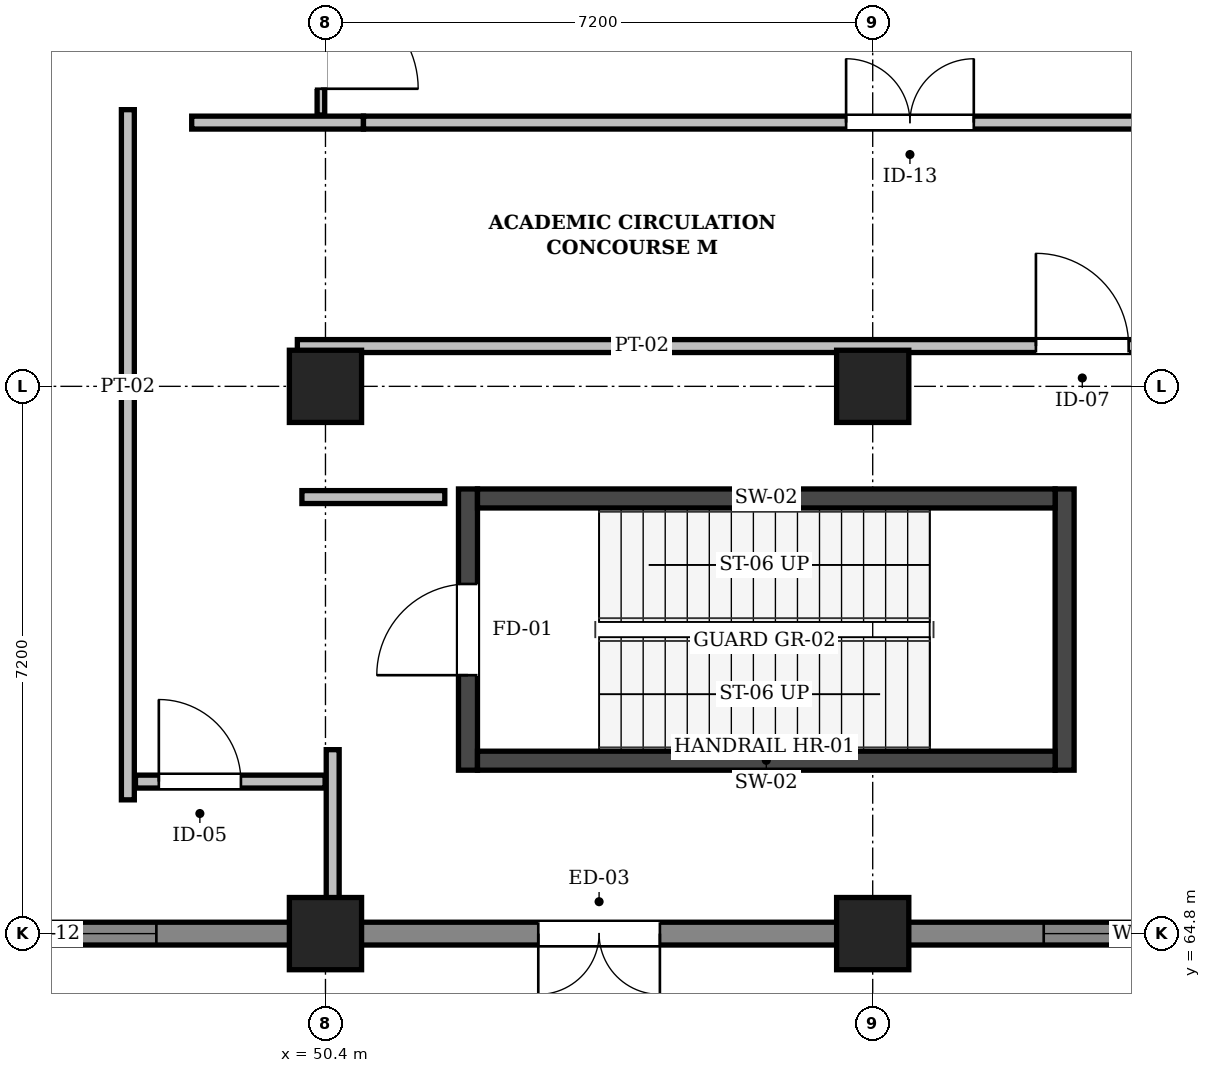
"""IFC4 building model, lengths in metres.
Left out: names, types, materials, properties, quantities, classifications, styles, units other than length and angle.
Written with IfcOpenShell. Run it as: python <this file> out.ifc"""

import sys

from ifc_helpers import new_model, si_unit, direction, frame, frame_2d, origin, origin_2d, place, context, subcontext, project, spatial, rectangle, extrude, element, fill, save


model = new_model("IFC4")
c1 = context("Model", 3, precision=1e-05, world=origin(), true_north=direction((0.0, 1.0)))
c2 = subcontext(c1, "Body", "Model", "MODEL_VIEW")
j1 = project(units=[si_unit("LENGTHUNIT", "METRE"), si_unit("PLANEANGLEUNIT", "RADIAN")], contexts=[c1])
p1 = place(None, origin())
s1 = spatial("IfcSite", under=j1, at=p1, CompositionType="ELEMENT")
p2 = place(p1, origin())
s2 = spatial("IfcBuilding", under=s1, at=p2, CompositionType="ELEMENT")
p3 = place(p2, origin())
s3 = spatial("IfcBuildingStorey", under=s2, at=p3, CompositionType="ELEMENT", Elevation=0.0)
for number, where, z_axis, x_axis in (
    (1, (50.4, 64.8, 0.0), (0.0, 0.0, 1.0), (1.0, 0.0, 0.0)),
    (2, (50.4, 72.0, 0.0), (0.0, 0.0, 1.0), (1.0, 0.0, 0.0)),
    (3, (57.6, 64.8, 0.0), (0.0, 0.0, 1.0), (1.0, 0.0, 0.0)),
    (4, (57.6, 72.0, 0.0), (0.0, 0.0, 1.0), (1.0, 0.0, 0.0)),
):
    element("IfcColumn", number, at=place(p3, frame(where, z_axis=z_axis, x_axis=x_axis)), inside=s3, PredefinedType="COLUMN", context=c2, shape_type="SweptSolid", body=[
        extrude(rectangle(XDim=0.95, YDim=0.95, at=origin_2d()), origin(), (0.0, 0.0, 1.0), 4.8),
    ])
p4 = place(p3, frame((64.8, 64.8, 0.0), z_axis=(0.0, 0.0, 1.0), x_axis=(-1.0, 0.0, 0.0)))
e5 = element("IfcWall", 5, at=p4, inside=s3, PredefinedType="SOLIDWALL", context=c2, shape_type="SweptSolid", body=[
    extrude(rectangle(XDim=7.2, YDim=0.3, at=frame_2d((3.6, 0.0))), origin(), (0.0, 0.0, 1.0), 4.52),
])
p5 = place(p4, frame((2.25, 0.0, 0.95)))
e6 = element("IfcOpeningElement", 6, at=p5, cuts=e5, PredefinedType="OPENING", context=c2, shape_type="SweptSolid", body=[
    extrude(rectangle(XDim=2.7, YDim=1.3, at=frame_2d((1.35, 0.65))), frame((0.0, 0.162, 0.0), z_axis=(0.0, -1.0, 0.0), x_axis=(1.0, 0.0, 0.0)), (0.0, 0.0, 1.0), 0.324),
])
p6 = place(p3, frame((57.6, 64.8, 0.0), z_axis=(0.0, 0.0, 1.0), x_axis=(-1.0, 0.0, 0.0)))
e7 = element("IfcWall", 7, at=p6, inside=s3, PredefinedType="SOLIDWALL", context=c2, shape_type="SweptSolid", body=[
    extrude(rectangle(XDim=7.2, YDim=0.3, at=frame_2d((3.6, 0.0))), origin(), (0.0, 0.0, 1.0), 4.52),
])
p7 = place(p6, frame((2.8, 0.0, 0.0)))
e8 = element("IfcOpeningElement", 8, at=p7, cuts=e7, PredefinedType="OPENING", context=c2, shape_type="SweptSolid", body=[
    extrude(rectangle(XDim=1.6, YDim=2.2, at=frame_2d((0.8, 1.1))), frame((0.0, 0.162, 0.0), z_axis=(0.0, -1.0, 0.0), x_axis=(1.0, 0.0, 0.0)), (0.0, 0.0, 1.0), 0.324),
])
p8 = place(p3, frame((50.4, 64.8, 0.0), z_axis=(0.0, 0.0, 1.0), x_axis=(-1.0, 0.0, 0.0)))
e9 = element("IfcWall", 9, at=p8, inside=s3, PredefinedType="SOLIDWALL", context=c2, shape_type="SweptSolid", body=[
    extrude(rectangle(XDim=7.35, YDim=0.3, at=frame_2d((3.675, 0.0))), origin(), (0.0, 0.0, 1.0), 4.52),
])
p9 = place(p8, frame((2.225, 0.0, 0.95)))
e10 = element("IfcOpeningElement", 10, at=p9, cuts=e9, PredefinedType="OPENING", context=c2, shape_type="SweptSolid", body=[
    extrude(rectangle(XDim=2.9, YDim=1.3, at=frame_2d((1.45, 0.65))), frame((0.0, 0.162, 0.0), z_axis=(0.0, -1.0, 0.0), x_axis=(1.0, 0.0, 0.0)), (0.0, 0.0, 1.0), 0.324),
])
p10 = place(p3, frame((52.275, 66.95, 0.0), z_axis=(0.0, 0.0, 1.0), x_axis=(0.0, 1.0, 0.0)))
e11 = element("IfcWall", 11, at=p10, inside=s3, PredefinedType="SHEAR", context=c2, shape_type="SweptSolid", body=[
    extrude(rectangle(XDim=3.7, YDim=0.25, at=frame_2d((1.85, 0.0))), origin(), (0.0, 0.0, 1.0), 4.55),
])
p11 = place(p10, frame((1.25, 0.0, 0.0)))
e12 = element("IfcOpeningElement", 12, at=p11, cuts=e11, PredefinedType="OPENING", context=c2, shape_type="SweptSolid", body=[
    extrude(rectangle(XDim=1.2, YDim=2.15, at=frame_2d((0.6, 1.075))), frame((0.0, 0.137, 0.0), z_axis=(0.0, -1.0, 0.0), x_axis=(1.0, 0.0, 0.0)), (0.0, 0.0, 1.0), 0.274),
])
p12 = place(p3, frame((60.125, 66.95, 0.0), z_axis=(0.0, 0.0, 1.0), x_axis=(0.0, 1.0, 0.0)))
e13 = element("IfcWall", 13, at=p12, inside=s3, PredefinedType="SHEAR", context=c2, shape_type="SweptSolid", body=[
    extrude(rectangle(XDim=3.7, YDim=0.25, at=frame_2d((1.85, 0.0))), origin(), (0.0, 0.0, 1.0), 4.55),
])
for number, where, z_axis, x_axis in (
    (14, (52.4, 67.075, 0.0), (0.0, 0.0, 1.0), (1.0, 0.0, 0.0)),
    (15, (52.4, 70.525, 0.0), (0.0, 0.0, 1.0), (1.0, 0.0, 0.0)),
):
    element("IfcWall", number, at=place(p3, frame(where, z_axis=z_axis, x_axis=x_axis)), inside=s3, PredefinedType="SHEAR", context=c2, shape_type="SweptSolid", body=[
        extrude(rectangle(XDim=7.6, YDim=0.25, at=frame_2d((3.8, 0.0))), origin(), (0.0, 0.0, 1.0), 4.55),
    ])
p13 = place(p3, frame((50.495, 64.962, 0.0), z_axis=(0.0, 0.0, 1.0), x_axis=(0.0, 1.0, 0.0)))
e16 = element("IfcWall", 16, at=p13, inside=s3, PredefinedType="PARTITIONING", context=c2, shape_type="SweptSolid", body=[
    extrude(rectangle(XDim=2.258, YDim=0.17, at=frame_2d((1.129, 0.0))), origin(), (0.0, 0.0, 1.0), 4.08),
])
p14 = place(p3, frame((50.09, 70.543, 0.0), z_axis=(0.0, 0.0, 1.0), x_axis=(1.0, 0.0, 0.0)))
e17 = element("IfcWall", 17, at=p14, inside=s3, PredefinedType="PARTITIONING", context=c2, shape_type="SweptSolid", body=[
    extrude(rectangle(XDim=1.88, YDim=0.17, at=frame_2d((0.94, 0.0))), origin(), (0.0, 0.0, 1.0), 4.46),
])
p15 = place(p3, frame((48.64, 75.47, 0.0), z_axis=(0.0, 0.0, 1.0), x_axis=(1.0, 0.0, 0.0)))
e18 = element("IfcWall", 18, at=p15, inside=s3, PredefinedType="PARTITIONING", context=c2, shape_type="SweptSolid", body=[
    extrude(rectangle(XDim=2.26, YDim=0.17, at=frame_2d((1.13, 0.0))), origin(), (0.0, 0.0, 1.0), 4.46),
])
p16 = place(p3, frame((50.9, 75.47, 0.0), z_axis=(0.0, 0.0, 1.0), x_axis=(1.0, 0.0, 0.0)))
e19 = element("IfcWall", 19, at=p16, inside=s3, PredefinedType="PARTITIONING", context=c2, shape_type="SweptSolid", body=[
    extrude(rectangle(XDim=14.38, YDim=0.17, at=frame_2d((7.19, 0.0))), origin(), (0.0, 0.0, 1.0), 4.46),
])
p17 = place(p16, frame((6.35, 0.0, 0.0)))
e20 = element("IfcOpeningElement", 20, at=p17, cuts=e19, PredefinedType="OPENING", context=c2, shape_type="SweptSolid", body=[
    extrude(rectangle(XDim=1.68, YDim=2.28, at=frame_2d((0.84, 1.14))), frame((0.0, 0.097, 0.0), z_axis=(0.0, -1.0, 0.0), x_axis=(1.0, 0.0, 0.0)), (0.0, 0.0, 1.0), 0.194),
])
p18 = place(p3, frame((50.03, 72.53, 0.0), z_axis=(0.0, 0.0, 1.0), x_axis=(1.0, 0.0, 0.0)))
e21 = element("IfcWall", 21, at=p18, inside=s3, PredefinedType="PARTITIONING", context=c2, shape_type="SweptSolid", body=[
    extrude(rectangle(XDim=16.655, YDim=0.17, at=frame_2d((8.328, 0.0))), origin(), (0.0, 0.0, 1.0), 4.46),
])
p19 = place(p18, frame((9.718, 0.0, 0.0)))
e22 = element("IfcOpeningElement", 22, at=p19, cuts=e21, PredefinedType="OPENING", context=c2, shape_type="SweptSolid", body=[
    extrude(rectangle(XDim=1.22, YDim=2.22, at=frame_2d((0.61, 1.11))), frame((0.0, 0.097, 0.0), z_axis=(0.0, -1.0, 0.0), x_axis=(1.0, 0.0, 0.0)), (0.0, 0.0, 1.0), 0.194),
])
p20 = place(p3, frame((47.8, 66.56, 0.0), z_axis=(0.0, 0.0, 1.0), x_axis=(0.0, 1.0, 0.0)))
e23 = element("IfcWall", 23, at=p20, inside=s3, PredefinedType="PARTITIONING", context=c2, shape_type="SweptSolid", body=[
    extrude(rectangle(XDim=9.08, YDim=0.17, at=frame_2d((4.54, 0.0))), origin(), (0.0, 0.0, 1.0), 4.46),
])
p21 = place(p3, frame((47.9, 66.8, 0.0), z_axis=(0.0, 0.0, 1.0), x_axis=(1.0, 0.0, 0.0)))
e24 = element("IfcWall", 24, at=p21, inside=s3, PredefinedType="PARTITIONING", context=c2, shape_type="SweptSolid", body=[
    extrude(rectangle(XDim=2.495, YDim=0.17, at=frame_2d((1.248, 0.0))), origin(), (0.0, 0.0, 1.0), 4.46),
])
p22 = place(p21, frame((0.308, 0.0, 0.0)))
e25 = element("IfcOpeningElement", 25, at=p22, cuts=e24, PredefinedType="OPENING", context=c2, shape_type="SweptSolid", body=[
    extrude(rectangle(XDim=1.08, YDim=2.2, at=frame_2d((0.54, 1.1))), frame((0.0, 0.097, 0.0), z_axis=(0.0, -1.0, 0.0), x_axis=(1.0, 0.0, 0.0)), (0.0, 0.0, 1.0), 0.194),
])
p23 = place(p3, frame((50.34, 75.57, 0.0), z_axis=(0.0, 0.0, 1.0), x_axis=(0.0, 1.0, 0.0)))
e26 = element("IfcWall", 26, at=p23, inside=s3, PredefinedType="PARTITIONING", context=c2, shape_type="SweptSolid", body=[
    extrude(rectangle(XDim=3.17, YDim=0.1, at=frame_2d((1.585, 0.0))), origin(), (0.0, 0.0, 1.0), 4.08),
])
p24 = place(p23, frame((0.345, 0.0, 0.0)))
e27 = element("IfcOpeningElement", 27, at=p24, cuts=e26, PredefinedType="OPENING", context=c2, shape_type="SweptSolid", body=[
    extrude(rectangle(XDim=1.28, YDim=2.22, at=frame_2d((0.64, 1.11))), frame((0.0, 0.062, 0.0), z_axis=(0.0, -1.0, 0.0), x_axis=(1.0, 0.0, 0.0)), (0.0, 0.0, 1.0), 0.124),
])
p25 = place(p5, origin())
e28 = element("IfcWindow", 28, at=p25, inside=s3, PartitioningType="SINGLE_PANEL", PredefinedType="WINDOW", context=c2, shape_type="SweptSolid", body=[
    extrude(rectangle(XDim=2.7, YDim=1.3, at=frame_2d((1.35, 0.65))), frame((0.0, 0.03, 0.0), z_axis=(0.0, -1.0, 0.0), x_axis=(1.0, 0.0, 0.0)), (0.0, 0.0, 1.0), 0.06),
])
fill(e6, e28)
p26 = place(p7, origin())
e29 = element("IfcDoor", 29, at=p26, inside=s3, OperationType="DOUBLE_DOOR_SINGLE_SWING", PredefinedType="DOOR", context=c2, shape_type="SweptSolid", body=[
    extrude(rectangle(XDim=1.6, YDim=2.2, at=frame_2d((0.8, 1.1))), frame((0.0, 0.025, 0.0), z_axis=(0.0, -1.0, 0.0), x_axis=(1.0, 0.0, 0.0)), (0.0, 0.0, 1.0), 0.05),
])
fill(e8, e29)
p27 = place(p9, origin())
e30 = element("IfcWindow", 30, at=p27, inside=s3, PartitioningType="SINGLE_PANEL", PredefinedType="WINDOW", context=c2, shape_type="SweptSolid", body=[
    extrude(rectangle(XDim=2.9, YDim=1.3, at=frame_2d((1.45, 0.65))), frame((0.0, 0.03, 0.0), z_axis=(0.0, -1.0, 0.0), x_axis=(1.0, 0.0, 0.0)), (0.0, 0.0, 1.0), 0.06),
])
fill(e10, e30)
p28 = place(p11, origin())
e31 = element("IfcDoor", 31, at=p28, inside=s3, OperationType="SINGLE_SWING_LEFT", PredefinedType="DOOR", context=c2, shape_type="SweptSolid", body=[
    extrude(rectangle(XDim=1.2, YDim=2.15, at=frame_2d((0.6, 1.075))), frame((0.0, 0.025, 0.0), z_axis=(0.0, -1.0, 0.0), x_axis=(1.0, 0.0, 0.0)), (0.0, 0.0, 1.0), 0.05),
])
fill(e12, e31)
p29 = place(p19, origin())
e32 = element("IfcDoor", 32, at=p29, inside=s3, OperationType="SINGLE_SWING_LEFT", PredefinedType="DOOR", context=c2, shape_type="SweptSolid", body=[
    extrude(rectangle(XDim=1.22, YDim=2.22, at=frame_2d((0.61, 1.11))), frame((0.0, 0.025, 0.0), z_axis=(0.0, -1.0, 0.0), x_axis=(1.0, 0.0, 0.0)), (0.0, 0.0, 1.0), 0.05),
])
fill(e22, e32)
p30 = place(p17, origin())
e33 = element("IfcDoor", 33, at=p30, inside=s3, OperationType="DOUBLE_DOOR_SINGLE_SWING", PredefinedType="DOOR", context=c2, shape_type="SweptSolid", body=[
    extrude(rectangle(XDim=1.68, YDim=2.28, at=frame_2d((0.84, 1.14))), frame((0.0, 0.025, 0.0), z_axis=(0.0, -1.0, 0.0), x_axis=(1.0, 0.0, 0.0)), (0.0, 0.0, 1.0), 0.05),
])
fill(e20, e33)
p31 = place(p24, frame((1.28, 0.0, 0.0), z_axis=(0.0, 0.0, 1.0), x_axis=(-1.0, 0.0, 0.0)))
e34 = element("IfcDoor", 34, at=p31, inside=s3, OperationType="SINGLE_SWING_RIGHT", PredefinedType="DOOR", context=c2, shape_type="SweptSolid", body=[
    extrude(rectangle(XDim=1.28, YDim=2.22, at=frame_2d((0.64, 1.11))), frame((0.0, 0.025, 0.0), z_axis=(0.0, -1.0, 0.0), x_axis=(1.0, 0.0, 0.0)), (0.0, 0.0, 1.0), 0.05),
])
fill(e27, e34)
p32 = place(p22, origin())
e35 = element("IfcDoor", 35, at=p32, inside=s3, OperationType="SINGLE_SWING_LEFT", PredefinedType="DOOR", context=c2, shape_type="SweptSolid", body=[
    extrude(rectangle(XDim=1.08, YDim=2.2, at=frame_2d((0.54, 1.1))), frame((0.0, 0.025, 0.0), z_axis=(0.0, -1.0, 0.0), x_axis=(1.0, 0.0, 0.0)), (0.0, 0.0, 1.0), 0.05),
])
fill(e25, e35)
save(model, sys.argv[1])
